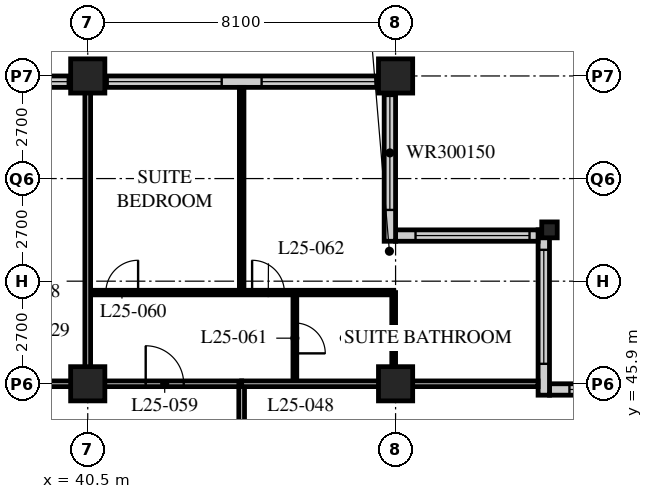
"""IFC4 building model, lengths in metres.
Left out: names, types, materials, properties, quantities, classifications, styles, units other than length and angle.
Written with IfcOpenShell. Run it as: python <this file> out.ifc"""

import sys

from ifc_helpers import new_model, si_unit, direction, frame, frame_2d, origin, origin_2d, place, context, subcontext, project, spatial, rectangle, hollow_rectangle, i_section, extrude, element, fill, save


model = new_model("IFC4")
c1 = context("Model", 3, precision=1e-05, world=origin(), true_north=direction((0.0, 1.0)))
c2 = subcontext(c1, "Body", "Model", "MODEL_VIEW")
j1 = project(units=[si_unit("LENGTHUNIT", "METRE"), si_unit("PLANEANGLEUNIT", "RADIAN")], contexts=[c1])
p1 = place(None, origin())
s1 = spatial("IfcSite", under=j1, at=p1, CompositionType="ELEMENT")
p2 = place(p1, origin())
s2 = spatial("IfcBuilding", under=s1, at=p2, CompositionType="ELEMENT")
p3 = place(p2, frame((0.0, 0.0, 103.4)))
s3 = spatial("IfcBuildingStorey", under=s2, at=p3, CompositionType="ELEMENT", Elevation=103.4)
p4 = place(p3, frame((40.5, 45.9, 0.0), z_axis=(0.0, 0.0, 1.0), x_axis=(1.0, 0.0, 0.0)))
e1 = element("IfcColumn", 1, at=p4, inside=s3, PredefinedType="COLUMN", context=c2, shape_type="SweptSolid", body=[
    extrude(hollow_rectangle(XDim=0.9, YDim=0.9, WallThickness=0.1, at=origin_2d()), origin(), (0.0, 0.0, 1.0), 3.4),
])
p5 = place(p3, frame((40.5, 54.0, 0.0), z_axis=(0.0, 0.0, 1.0), x_axis=(1.0, 0.0, 0.0)))
e2 = element("IfcColumn", 2, at=p5, inside=s3, PredefinedType="COLUMN", context=c2, shape_type="SweptSolid", body=[
    extrude(hollow_rectangle(XDim=0.9, YDim=0.9, WallThickness=0.09, at=origin_2d()), origin(), (0.0, 0.0, 1.0), 3.4),
])
p6 = place(p3, frame((48.6, 45.9, 0.0), z_axis=(0.0, 0.0, 1.0), x_axis=(1.0, 0.0, 0.0)))
e3 = element("IfcColumn", 3, at=p6, inside=s3, PredefinedType="COLUMN", context=c2, shape_type="SweptSolid", body=[
    extrude(hollow_rectangle(XDim=0.9, YDim=0.9, WallThickness=0.1, at=origin_2d()), origin(), (0.0, 0.0, 1.0), 3.4),
])
p7 = place(p3, frame((48.6, 54.0, 0.0), z_axis=(0.0, 0.0, 1.0), x_axis=(1.0, 0.0, 0.0)))
e4 = element("IfcColumn", 4, at=p7, inside=s3, PredefinedType="COLUMN", context=c2, shape_type="SweptSolid", body=[
    extrude(hollow_rectangle(XDim=0.9, YDim=0.9, WallThickness=0.09, at=origin_2d()), origin(), (0.0, 0.0, 1.0), 3.4),
])
p8 = place(p3, frame((52.65, 49.95, 0.0), z_axis=(0.0, 0.0, 1.0), x_axis=(1.0, 0.0, 0.0)))
e5 = element("IfcColumn", 5, at=p8, inside=s3, PredefinedType="COLUMN", context=c2, shape_type="SweptSolid", body=[
    extrude(i_section(OverallWidth=0.407, OverallDepth=0.419, WebThickness=0.031, FlangeThickness=0.049, FilletRadius=0.015, at=origin_2d()), origin(), (0.0, 0.0, 1.0), 3.4),
])
p9 = place(p3, frame((56.4, 45.75, 0.0), z_axis=(0.0, 0.0, 1.0), x_axis=(-1.0, 0.0, 0.0)))
e6 = element("IfcWall", 6, at=p9, inside=s3, PredefinedType="SOLIDWALL", context=c2, shape_type="SweptSolid", body=[
    extrude(rectangle(XDim=3.75, YDim=0.3, at=frame_2d((1.875, 0.0))), origin(), (0.0, 0.0, 1.0), 3.19),
])
p10 = place(p9, frame((0.225, 0.0, 0.9)))
e7 = element("IfcOpeningElement", 7, at=p10, cuts=e6, PredefinedType="OPENING", context=c2, shape_type="SweptSolid", body=[
    extrude(rectangle(XDim=3.0, YDim=1.5, at=frame_2d((1.5, 0.75))), frame((0.0, 0.16, 0.0), z_axis=(0.0, -1.0, 0.0), x_axis=(1.0, 0.0, 0.0)), (0.0, 0.0, 1.0), 0.32),
])
p11 = place(p3, frame((52.5, 45.6, 0.0), z_axis=(0.0, 0.0, 1.0), x_axis=(0.0, 1.0, 0.0)))
e8 = element("IfcWall", 8, at=p11, inside=s3, PredefinedType="SOLIDWALL", context=c2, shape_type="SweptSolid", body=[
    extrude(rectangle(XDim=4.35, YDim=0.3, at=frame_2d((2.175, 0.0))), origin(), (0.0, 0.0, 1.0), 3.19),
])
p12 = place(p11, frame((0.825, 0.0, 0.9)))
e9 = element("IfcOpeningElement", 9, at=p12, cuts=e8, PredefinedType="OPENING", context=c2, shape_type="SweptSolid", body=[
    extrude(rectangle(XDim=3.0, YDim=1.5, at=frame_2d((1.5, 0.75))), frame((0.0, 0.16, 0.0), z_axis=(0.0, -1.0, 0.0), x_axis=(1.0, 0.0, 0.0)), (0.0, 0.0, 1.0), 0.32),
])
p13 = place(p3, frame((52.35, 49.8, 0.0), z_axis=(0.0, 0.0, 1.0), x_axis=(-1.0, 0.0, 0.0)))
e10 = element("IfcWall", 10, at=p13, inside=s3, PredefinedType="SOLIDWALL", context=c2, shape_type="SweptSolid", body=[
    extrude(rectangle(XDim=3.75, YDim=0.3, at=frame_2d((1.875, 0.0))), origin(), (0.0, 0.0, 1.0), 3.19),
])
p14 = place(p13, frame((0.225, 0.0, 0.9)))
e11 = element("IfcOpeningElement", 11, at=p14, cuts=e10, PredefinedType="OPENING", context=c2, shape_type="SweptSolid", body=[
    extrude(rectangle(XDim=3.0, YDim=1.5, at=frame_2d((1.5, 0.75))), frame((0.0, 0.16, 0.0), z_axis=(0.0, -1.0, 0.0), x_axis=(1.0, 0.0, 0.0)), (0.0, 0.0, 1.0), 0.32),
])
p15 = place(p3, frame((48.45, 49.65, 0.0), z_axis=(0.0, 0.0, 1.0), x_axis=(0.0, 1.0, 0.0)))
e12 = element("IfcWall", 12, at=p15, inside=s3, PredefinedType="SOLIDWALL", context=c2, shape_type="SweptSolid", body=[
    extrude(rectangle(XDim=4.35, YDim=0.3, at=frame_2d((2.175, 0.0))), origin(), (0.0, 0.0, 1.0), 2.64),
])
p16 = place(p15, frame((0.825, 0.0, 0.9)))
e13 = element("IfcOpeningElement", 13, at=p16, cuts=e12, PredefinedType="OPENING", context=c2, shape_type="SweptSolid", body=[
    extrude(rectangle(XDim=3.0, YDim=1.5, at=frame_2d((1.5, 0.75))), frame((0.0, 0.16, 0.0), z_axis=(0.0, -1.0, 0.0), x_axis=(1.0, 0.0, 0.0)), (0.0, 0.0, 1.0), 0.32),
])
p17 = place(p3, frame((48.3, 53.85, 0.0), z_axis=(0.0, 0.0, 1.0), x_axis=(-1.0, 0.0, 0.0)))
e14 = element("IfcWall", 14, at=p17, inside=s3, PredefinedType="SOLIDWALL", context=c2, shape_type="SweptSolid", body=[
    extrude(rectangle(XDim=40.2, YDim=0.3, at=frame_2d((20.1, 0.0))), origin(), (0.0, 0.0, 1.0), 3.19),
])
p18 = place(p17, frame((0.225, 0.0, 0.9)))
e15 = element("IfcOpeningElement", 15, at=p18, cuts=e14, PredefinedType="OPENING", context=c2, shape_type="SweptSolid", body=[
    extrude(rectangle(XDim=3.0, YDim=2.0, at=frame_2d((1.5, 1.0))), frame((0.0, 0.16, 0.0), z_axis=(0.0, -1.0, 0.0), x_axis=(1.0, 0.0, 0.0)), (0.0, 0.0, 1.0), 0.32),
])
p19 = place(p17, frame((4.275, 0.0, 0.9)))
e16 = element("IfcOpeningElement", 16, at=p19, cuts=e14, PredefinedType="OPENING", context=c2, shape_type="SweptSolid", body=[
    extrude(rectangle(XDim=3.0, YDim=2.0, at=frame_2d((1.5, 1.0))), frame((0.0, 0.16, 0.0), z_axis=(0.0, -1.0, 0.0), x_axis=(1.0, 0.0, 0.0)), (0.0, 0.0, 1.0), 0.32),
])
p20 = place(p17, frame((8.325, 0.0, 0.9)))
e17 = element("IfcOpeningElement", 17, at=p20, cuts=e14, PredefinedType="OPENING", context=c2, shape_type="SweptSolid", body=[
    extrude(rectangle(XDim=3.0, YDim=2.0, at=frame_2d((1.5, 1.0))), frame((0.0, 0.16, 0.0), z_axis=(0.0, -1.0, 0.0), x_axis=(1.0, 0.0, 0.0)), (0.0, 0.0, 1.0), 0.32),
])
p21 = place(p17, frame((12.375, 0.0, 0.9)))
e18 = element("IfcOpeningElement", 18, at=p21, cuts=e14, PredefinedType="OPENING", context=c2, shape_type="SweptSolid", body=[
    extrude(rectangle(XDim=3.0, YDim=2.0, at=frame_2d((1.5, 1.0))), frame((0.0, 0.16, 0.0), z_axis=(0.0, -1.0, 0.0), x_axis=(1.0, 0.0, 0.0)), (0.0, 0.0, 1.0), 0.32),
])
p22 = place(p17, frame((16.425, 0.0, 0.9)))
e19 = element("IfcOpeningElement", 19, at=p22, cuts=e14, PredefinedType="OPENING", context=c2, shape_type="SweptSolid", body=[
    extrude(rectangle(XDim=3.0, YDim=2.0, at=frame_2d((1.5, 1.0))), frame((0.0, 0.16, 0.0), z_axis=(0.0, -1.0, 0.0), x_axis=(1.0, 0.0, 0.0)), (0.0, 0.0, 1.0), 0.32),
])
p23 = place(p17, frame((20.475, 0.0, 0.9)))
e20 = element("IfcOpeningElement", 20, at=p23, cuts=e14, PredefinedType="OPENING", context=c2, shape_type="SweptSolid", body=[
    extrude(rectangle(XDim=3.0, YDim=2.0, at=frame_2d((1.5, 1.0))), frame((0.0, 0.16, 0.0), z_axis=(0.0, -1.0, 0.0), x_axis=(1.0, 0.0, 0.0)), (0.0, 0.0, 1.0), 0.32),
])
p24 = place(p17, frame((24.525, 0.0, 0.9)))
e21 = element("IfcOpeningElement", 21, at=p24, cuts=e14, PredefinedType="OPENING", context=c2, shape_type="SweptSolid", body=[
    extrude(rectangle(XDim=3.0, YDim=2.0, at=frame_2d((1.5, 1.0))), frame((0.0, 0.16, 0.0), z_axis=(0.0, -1.0, 0.0), x_axis=(1.0, 0.0, 0.0)), (0.0, 0.0, 1.0), 0.32),
])
p25 = place(p17, frame((28.575, 0.0, 0.9)))
e22 = element("IfcOpeningElement", 22, at=p25, cuts=e14, PredefinedType="OPENING", context=c2, shape_type="SweptSolid", body=[
    extrude(rectangle(XDim=3.0, YDim=2.0, at=frame_2d((1.5, 1.0))), frame((0.0, 0.16, 0.0), z_axis=(0.0, -1.0, 0.0), x_axis=(1.0, 0.0, 0.0)), (0.0, 0.0, 1.0), 0.32),
])
p26 = place(p17, frame((32.625, 0.0, 0.9)))
e23 = element("IfcOpeningElement", 23, at=p26, cuts=e14, PredefinedType="OPENING", context=c2, shape_type="SweptSolid", body=[
    extrude(rectangle(XDim=3.0, YDim=2.0, at=frame_2d((1.5, 1.0))), frame((0.0, 0.16, 0.0), z_axis=(0.0, -1.0, 0.0), x_axis=(1.0, 0.0, 0.0)), (0.0, 0.0, 1.0), 0.32),
])
p27 = place(p17, frame((36.675, 0.0, 0.9)))
e24 = element("IfcOpeningElement", 24, at=p27, cuts=e14, PredefinedType="OPENING", context=c2, shape_type="SweptSolid", body=[
    extrude(rectangle(XDim=3.0, YDim=2.0, at=frame_2d((1.5, 1.0))), frame((0.0, 0.16, 0.0), z_axis=(0.0, -1.0, 0.0), x_axis=(1.0, 0.0, 0.0)), (0.0, 0.0, 1.0), 0.32),
])
p28 = place(p3, frame((12.15, 45.9, 0.0), z_axis=(0.0, 0.0, 1.0), x_axis=(1.0, 0.0, 0.0)))
e25 = element("IfcWall", 25, at=p28, inside=s3, PredefinedType="PARTITIONING", context=c2, shape_type="SweptSolid", body=[
    extrude(rectangle(XDim=32.4, YDim=0.15, at=frame_2d((16.2, 0.0))), origin(), (0.0, 0.0, 1.0), 2.578),
])
p29 = place(p28, frame((9.5, 0.0, 0.0)))
e26 = element("IfcOpeningElement", 26, at=p29, cuts=e25, PredefinedType="OPENING", context=c2, shape_type="SweptSolid", body=[
    extrude(rectangle(XDim=1.0, YDim=2.1, at=frame_2d((0.5, 1.05))), frame((0.0, 0.085, 0.0), z_axis=(0.0, -1.0, 0.0), x_axis=(1.0, 0.0, 0.0)), (0.0, 0.0, 1.0), 0.17),
])
p30 = place(p28, frame((17.6, 0.0, 0.0)))
e27 = element("IfcOpeningElement", 27, at=p30, cuts=e25, PredefinedType="OPENING", context=c2, shape_type="SweptSolid", body=[
    extrude(rectangle(XDim=1.0, YDim=2.1, at=frame_2d((0.5, 1.05))), frame((0.0, 0.085, 0.0), z_axis=(0.0, -1.0, 0.0), x_axis=(1.0, 0.0, 0.0)), (0.0, 0.0, 1.0), 0.17),
])
p31 = place(p28, frame((25.7, 0.0, 0.0)))
e28 = element("IfcOpeningElement", 28, at=p31, cuts=e25, PredefinedType="OPENING", context=c2, shape_type="SweptSolid", body=[
    extrude(rectangle(XDim=1.0, YDim=2.1, at=frame_2d((0.5, 1.05))), frame((0.0, 0.085, 0.0), z_axis=(0.0, -1.0, 0.0), x_axis=(1.0, 0.0, 0.0)), (0.0, 0.0, 1.0), 0.17),
])
p32 = place(p28, frame((29.875, 0.0, 0.0)))
e29 = element("IfcOpeningElement", 29, at=p32, cuts=e25, PredefinedType="OPENING", context=c2, shape_type="SweptSolid", body=[
    extrude(rectangle(XDim=1.0, YDim=2.1, at=frame_2d((0.5, 1.05))), frame((0.0, 0.085, 0.0), z_axis=(0.0, -1.0, 0.0), x_axis=(1.0, 0.0, 0.0)), (0.0, 0.0, 1.0), 0.17),
])
p33 = place(p28, frame((1.525, 0.0, 0.0)))
e30 = element("IfcOpeningElement", 30, at=p33, cuts=e25, PredefinedType="OPENING", context=c2, shape_type="SweptSolid", body=[
    extrude(rectangle(XDim=1.0, YDim=2.1, at=frame_2d((0.5, 1.05))), frame((0.0, 0.085, 0.0), z_axis=(0.0, -1.0, 0.0), x_axis=(1.0, 0.0, 0.0)), (0.0, 0.0, 1.0), 0.17),
])
p34 = place(p3, frame((44.55, 21.6, 0.0), z_axis=(0.0, 0.0, 1.0), x_axis=(0.0, 1.0, 0.0)))
e31 = element("IfcWall", 31, at=p34, inside=s3, PredefinedType="PARTITIONING", context=c2, shape_type="SweptSolid", body=[
    extrude(rectangle(XDim=24.3, YDim=0.15, at=frame_2d((12.15, 0.0))), origin(), (0.0, 0.0, 1.0), 3.19),
])
p35 = place(p34, frame((2.75, 0.0, 0.0)))
e32 = element("IfcOpeningElement", 32, at=p35, cuts=e31, PredefinedType="OPENING", context=c2, shape_type="SweptSolid", body=[
    extrude(rectangle(XDim=1.0, YDim=2.1, at=frame_2d((0.5, 1.05))), frame((0.0, 0.085, 0.0), z_axis=(0.0, -1.0, 0.0), x_axis=(1.0, 0.0, 0.0)), (0.0, 0.0, 1.0), 0.17),
])
p36 = place(p34, frame((6.5, 0.0, 0.0)))
e33 = element("IfcOpeningElement", 33, at=p36, cuts=e31, PredefinedType="OPENING", context=c2, shape_type="SweptSolid", body=[
    extrude(rectangle(XDim=1.0, YDim=2.1, at=frame_2d((0.5, 1.05))), frame((0.0, 0.085, 0.0), z_axis=(0.0, -1.0, 0.0), x_axis=(1.0, 0.0, 0.0)), (0.0, 0.0, 1.0), 0.17),
])
p37 = place(p34, frame((13.55, 0.0, 0.0)))
e34 = element("IfcOpeningElement", 34, at=p37, cuts=e31, PredefinedType="OPENING", context=c2, shape_type="SweptSolid", body=[
    extrude(rectangle(XDim=1.0, YDim=2.1, at=frame_2d((0.5, 1.05))), frame((0.0, 0.085, 0.0), z_axis=(0.0, -1.0, 0.0), x_axis=(1.0, 0.0, 0.0)), (0.0, 0.0, 1.0), 0.17),
])
p38 = place(p34, frame((21.65, 0.0, 0.0)))
e35 = element("IfcOpeningElement", 35, at=p38, cuts=e31, PredefinedType="OPENING", context=c2, shape_type="SweptSolid", body=[
    extrude(rectangle(XDim=1.0, YDim=2.1, at=frame_2d((0.5, 1.05))), frame((0.0, 0.085, 0.0), z_axis=(0.0, -1.0, 0.0), x_axis=(1.0, 0.0, 0.0)), (0.0, 0.0, 1.0), 0.17),
])
p39 = place(p3, frame((40.5, 48.3, 0.0), z_axis=(0.0, 0.0, 1.0), x_axis=(1.0, 0.0, 0.0)))
e36 = element("IfcWall", 36, at=p39, inside=s3, PredefinedType="PARTITIONING", context=c2, shape_type="SweptSolid", body=[
    extrude(rectangle(XDim=8.05, YDim=0.12, at=frame_2d((4.025, 0.0))), origin(), (0.0, 0.0, 1.0), 3.19),
])
p40 = place(p39, frame((0.475, 0.0, 0.0)))
e37 = element("IfcOpeningElement", 37, at=p40, cuts=e36, PredefinedType="OPENING", context=c2, shape_type="SweptSolid", body=[
    extrude(rectangle(XDim=0.85, YDim=2.1, at=frame_2d((0.425, 1.05))), frame((0.0, 0.07, 0.0), z_axis=(0.0, -1.0, 0.0), x_axis=(1.0, 0.0, 0.0)), (0.0, 0.0, 1.0), 0.14),
])
p41 = place(p39, frame((4.325, 0.0, 0.0)))
e38 = element("IfcOpeningElement", 38, at=p41, cuts=e36, PredefinedType="OPENING", context=c2, shape_type="SweptSolid", body=[
    extrude(rectangle(XDim=0.85, YDim=2.1, at=frame_2d((0.425, 1.05))), frame((0.0, 0.07, 0.0), z_axis=(0.0, -1.0, 0.0), x_axis=(1.0, 0.0, 0.0)), (0.0, 0.0, 1.0), 0.14),
])
p42 = place(p3, frame((45.95, 45.9, 0.0), z_axis=(0.0, 0.0, 1.0), x_axis=(0.0, 1.0, 0.0)))
e39 = element("IfcWall", 39, at=p42, inside=s3, PredefinedType="PARTITIONING", context=c2, shape_type="SweptSolid", body=[
    extrude(rectangle(XDim=2.4, YDim=0.1, at=frame_2d((1.2, 0.0))), origin(), (0.0, 0.0, 1.0), 3.19),
])
p43 = place(p42, frame((0.8, 0.0, 0.0)))
e40 = element("IfcOpeningElement", 40, at=p43, cuts=e39, PredefinedType="OPENING", context=c2, shape_type="SweptSolid", body=[
    extrude(rectangle(XDim=0.8, YDim=2.1, at=frame_2d((0.4, 1.05))), frame((0.0, 0.06, 0.0), z_axis=(0.0, -1.0, 0.0), x_axis=(1.0, 0.0, 0.0)), (0.0, 0.0, 1.0), 0.12),
])
p44 = place(p3, frame((48.55, 45.9, 0.0), z_axis=(0.0, 0.0, 1.0), x_axis=(0.0, 1.0, 0.0)))
e41 = element("IfcWall", 41, at=p44, inside=s3, PredefinedType="PARTITIONING", context=c2, shape_type="SweptSolid", body=[
    extrude(rectangle(XDim=2.4, YDim=0.1, at=frame_2d((1.2, 0.0))), origin(), (0.0, 0.0, 1.0), 2.64),
])
p45 = place(p3, frame((44.55, 48.3, 0.0), z_axis=(0.0, 0.0, 1.0), x_axis=(0.0, 1.0, 0.0)))
e42 = element("IfcWall", 42, at=p45, inside=s3, PredefinedType="PARTITIONING", context=c2, shape_type="SweptSolid", body=[
    extrude(rectangle(XDim=5.4, YDim=0.12, at=frame_2d((2.7, 0.0))), origin(), (0.0, 0.0, 1.0), 3.19),
])
p46 = place(p3, frame((44.55, 45.9, 0.0), z_axis=(0.0, 0.0, 1.0), x_axis=(1.0, 0.0, 0.0)))
e43 = element("IfcWall", 43, at=p46, inside=s3, PredefinedType="PARTITIONING", context=c2, shape_type="SweptSolid", body=[
    extrude(rectangle(XDim=7.8, YDim=0.15, at=frame_2d((3.9, 0.0))), origin(), (0.0, 0.0, 1.0), 2.578),
])
p47 = place(p3, frame((40.5, 45.9, 0.0), z_axis=(0.0, 0.0, 1.0), x_axis=(0.0, 1.0, 0.0)))
e44 = element("IfcWall", 44, at=p47, inside=s3, PredefinedType="PARTITIONING", context=c2, shape_type="SweptSolid", body=[
    extrude(rectangle(XDim=7.8, YDim=0.15, at=frame_2d((3.9, 0.0))), origin(), (0.0, 0.0, 1.0), 2.64),
])
p48 = place(p10, origin())
e45 = element("IfcWindow", 45, at=p48, inside=s3, PartitioningType="SINGLE_PANEL", PredefinedType="WINDOW", context=c2, shape_type="SweptSolid", body=[
    extrude(rectangle(XDim=3.0, YDim=1.5, at=frame_2d((1.5, 0.75))), frame((0.0, 0.03, 0.0), z_axis=(0.0, -1.0, 0.0), x_axis=(1.0, 0.0, 0.0)), (0.0, 0.0, 1.0), 0.06),
])
fill(e7, e45)
p49 = place(p12, origin())
e46 = element("IfcWindow", 46, at=p49, inside=s3, PartitioningType="SINGLE_PANEL", PredefinedType="WINDOW", context=c2, shape_type="SweptSolid", body=[
    extrude(rectangle(XDim=3.0, YDim=1.5, at=frame_2d((1.5, 0.75))), frame((0.0, 0.03, 0.0), z_axis=(0.0, -1.0, 0.0), x_axis=(1.0, 0.0, 0.0)), (0.0, 0.0, 1.0), 0.06),
])
fill(e9, e46)
p50 = place(p14, origin())
e47 = element("IfcWindow", 47, at=p50, inside=s3, PartitioningType="SINGLE_PANEL", PredefinedType="WINDOW", context=c2, shape_type="SweptSolid", body=[
    extrude(rectangle(XDim=3.0, YDim=1.5, at=frame_2d((1.5, 0.75))), frame((0.0, 0.03, 0.0), z_axis=(0.0, -1.0, 0.0), x_axis=(1.0, 0.0, 0.0)), (0.0, 0.0, 1.0), 0.06),
])
fill(e11, e47)
p51 = place(p16, origin())
e48 = element("IfcWindow", 48, at=p51, inside=s3, PartitioningType="SINGLE_PANEL", PredefinedType="WINDOW", context=c2, shape_type="SweptSolid", body=[
    extrude(rectangle(XDim=3.0, YDim=1.5, at=frame_2d((1.5, 0.75))), frame((0.0, 0.03, 0.0), z_axis=(0.0, -1.0, 0.0), x_axis=(1.0, 0.0, 0.0)), (0.0, 0.0, 1.0), 0.06),
])
fill(e13, e48)
p52 = place(p18, origin())
e49 = element("IfcWindow", 49, at=p52, inside=s3, PartitioningType="SINGLE_PANEL", PredefinedType="WINDOW", context=c2, shape_type="SweptSolid", body=[
    extrude(rectangle(XDim=3.0, YDim=2.0, at=frame_2d((1.5, 1.0))), frame((0.0, 0.03, 0.0), z_axis=(0.0, -1.0, 0.0), x_axis=(1.0, 0.0, 0.0)), (0.0, 0.0, 1.0), 0.06),
])
fill(e15, e49)
p53 = place(p19, origin())
e50 = element("IfcWindow", 50, at=p53, inside=s3, PartitioningType="SINGLE_PANEL", PredefinedType="WINDOW", context=c2, shape_type="SweptSolid", body=[
    extrude(rectangle(XDim=3.0, YDim=2.0, at=frame_2d((1.5, 1.0))), frame((0.0, 0.03, 0.0), z_axis=(0.0, -1.0, 0.0), x_axis=(1.0, 0.0, 0.0)), (0.0, 0.0, 1.0), 0.06),
])
fill(e16, e50)
p54 = place(p20, origin())
e51 = element("IfcWindow", 51, at=p54, inside=s3, PartitioningType="SINGLE_PANEL", PredefinedType="WINDOW", context=c2, shape_type="SweptSolid", body=[
    extrude(rectangle(XDim=3.0, YDim=2.0, at=frame_2d((1.5, 1.0))), frame((0.0, 0.03, 0.0), z_axis=(0.0, -1.0, 0.0), x_axis=(1.0, 0.0, 0.0)), (0.0, 0.0, 1.0), 0.06),
])
fill(e17, e51)
p55 = place(p32, origin())
e52 = element("IfcDoor", 52, at=p55, inside=s3, OperationType="SINGLE_SWING_LEFT", PredefinedType="DOOR", context=c2, shape_type="SweptSolid", body=[
    extrude(rectangle(XDim=1.0, YDim=2.1, at=frame_2d((0.5, 1.05))), frame((0.0, 0.025, 0.0), z_axis=(0.0, -1.0, 0.0), x_axis=(1.0, 0.0, 0.0)), (0.0, 0.0, 1.0), 0.05),
])
fill(e29, e52)
p56 = place(p40, origin())
e53 = element("IfcDoor", 53, at=p56, inside=s3, OperationType="SINGLE_SWING_RIGHT", PredefinedType="DOOR", context=c2, shape_type="SweptSolid", body=[
    extrude(rectangle(XDim=0.85, YDim=2.1, at=frame_2d((0.425, 1.05))), frame((0.0, 0.025, 0.0), z_axis=(0.0, -1.0, 0.0), x_axis=(1.0, 0.0, 0.0)), (0.0, 0.0, 1.0), 0.05),
])
fill(e37, e53)
p57 = place(p43, origin())
e54 = element("IfcDoor", 54, at=p57, inside=s3, OperationType="SINGLE_SWING_RIGHT", PredefinedType="DOOR", context=c2, shape_type="SweptSolid", body=[
    extrude(rectangle(XDim=0.8, YDim=2.1, at=frame_2d((0.4, 1.05))), frame((0.0, 0.025, 0.0), z_axis=(0.0, -1.0, 0.0), x_axis=(1.0, 0.0, 0.0)), (0.0, 0.0, 1.0), 0.05),
])
fill(e40, e54)
p58 = place(p41, origin())
e55 = element("IfcDoor", 55, at=p58, inside=s3, OperationType="SINGLE_SWING_LEFT", PredefinedType="DOOR", context=c2, shape_type="SweptSolid", body=[
    extrude(rectangle(XDim=0.85, YDim=2.1, at=frame_2d((0.425, 1.05))), frame((0.0, 0.025, 0.0), z_axis=(0.0, -1.0, 0.0), x_axis=(1.0, 0.0, 0.0)), (0.0, 0.0, 1.0), 0.05),
])
fill(e38, e55)
save(model, sys.argv[1])
